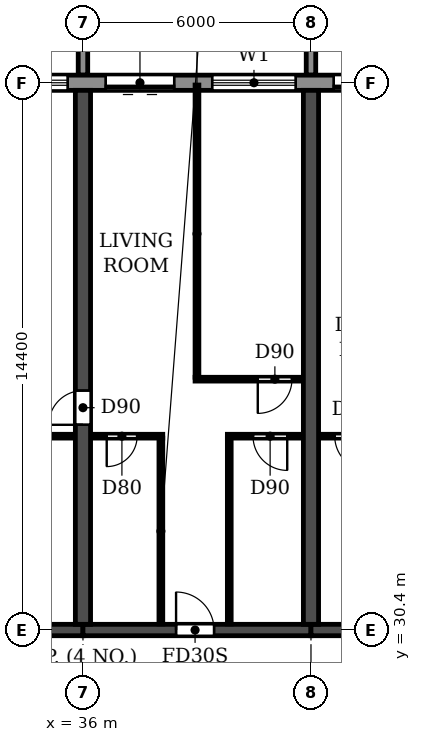
"""IFC4 building model, lengths in metres.
Left out: names, types, materials, properties, quantities, classifications, styles, units other than length and angle.
Written with IfcOpenShell. Run it as: python <this file> out.ifc"""

import sys

from ifc_helpers import new_model, si_unit, direction, frame, frame_2d, origin, place, context, subcontext, project, spatial, polyline, rectangle, outline, extrude, source, transform, mapped, element, fill, save


model = new_model("IFC4")
c1 = context("Model", 3, precision=1e-05, world=origin(), true_north=direction((0.0, 1.0)))
c2 = subcontext(c1, "Body", "Model", "MODEL_VIEW")
j1 = project(units=[si_unit("LENGTHUNIT", "METRE"), si_unit("PLANEANGLEUNIT", "RADIAN")], contexts=[c1])
p1 = place(None, origin())
s1 = spatial("IfcSite", under=j1, at=p1, CompositionType="ELEMENT")
p2 = place(p1, origin())
s2 = spatial("IfcBuilding", under=s1, at=p2, CompositionType="ELEMENT")
p3 = place(p2, frame((0.0, 0.0, 56.4)))
s3 = spatial("IfcBuildingStorey", under=s2, at=p3, CompositionType="ELEMENT", Elevation=56.4)
p4 = place(p3, frame((36.0, 30.55, 0.0), z_axis=(0.0, 0.0, 1.0), x_axis=(0.0, 1.0, 0.0)))
e1 = element("IfcWall", 1, at=p4, inside=s3, PredefinedType="SHEAR", context=c2, shape_type="SweptSolid", body=[
    extrude(rectangle(XDim=14.05, YDim=0.4, at=frame_2d((7.025, 0.0))), origin(), (0.0, 0.0, 1.0), 3.05),
])
p5 = place(p4, frame((5.25, 0.0, 0.0)))
e2 = element("IfcOpeningElement", 2, at=p5, cuts=e1, PredefinedType="OPENING", context=c2, shape_type="SweptSolid", body=[
    extrude(rectangle(XDim=0.9, YDim=2.1, at=frame_2d((0.45, 1.05))), frame((0.0, 0.21, 0.0), z_axis=(0.0, -1.0, 0.0), x_axis=(1.0, 0.0, 0.0)), (0.0, 0.0, 1.0), 0.42),
])
p6 = place(p3, frame((42.0, 30.55, 0.0), z_axis=(0.0, 0.0, 1.0), x_axis=(0.0, 1.0, 0.0)))
e3 = element("IfcWall", 3, at=p6, inside=s3, PredefinedType="SHEAR", context=c2, shape_type="SweptSolid", body=[
    extrude(rectangle(XDim=14.05, YDim=0.4, at=frame_2d((7.025, 0.0))), origin(), (0.0, 0.0, 1.0), 3.05),
])
p7 = place(p3, frame((30.0, 30.4, 0.0), z_axis=(0.0, 0.0, 1.0), x_axis=(1.0, 0.0, 0.0)))
e4 = element("IfcWall", 4, at=p7, inside=s3, PredefinedType="SHEAR", context=c2, shape_type="SweptSolid", body=[
    extrude(rectangle(XDim=6.0, YDim=0.3, at=frame_2d((3.0, 0.0))), origin(), (0.0, 0.0, 1.0), 2.45),
])
p8 = place(p3, frame((36.0, 30.4, 0.0), z_axis=(0.0, 0.0, 1.0), x_axis=(1.0, 0.0, 0.0)))
e5 = element("IfcWall", 5, at=p8, inside=s3, PredefinedType="SHEAR", context=c2, shape_type="SweptSolid", body=[
    extrude(rectangle(XDim=6.0, YDim=0.3, at=frame_2d((3.0, 0.0))), origin(), (0.0, 0.0, 1.0), 2.45),
])
p9 = place(p8, frame((2.45, 0.0, 0.0)))
e6 = element("IfcOpeningElement", 6, at=p9, cuts=e5, PredefinedType="OPENING", context=c2, shape_type="SweptSolid", body=[
    extrude(rectangle(XDim=1.0, YDim=2.1, at=frame_2d((0.5, 1.05))), frame((0.0, 0.16, 0.0), z_axis=(0.0, -1.0, 0.0), x_axis=(1.0, 0.0, 0.0)), (0.0, 0.0, 1.0), 0.32),
])
p10 = place(p3, frame((42.0, 30.4, 0.0), z_axis=(0.0, 0.0, 1.0), x_axis=(1.0, 0.0, 0.0)))
e7 = element("IfcWall", 7, at=p10, inside=s3, PredefinedType="SHEAR", context=c2, shape_type="SweptSolid", body=[
    extrude(rectangle(XDim=6.0, YDim=0.3, at=frame_2d((3.0, 0.0))), origin(), (0.0, 0.0, 1.0), 2.45),
])
p11 = place(p10, frame((2.55, 0.0, 0.0)))
e8 = element("IfcOpeningElement", 8, at=p11, cuts=e7, PredefinedType="OPENING", context=c2, shape_type="SweptSolid", body=[
    extrude(rectangle(XDim=1.0, YDim=2.1, at=frame_2d((0.5, 1.05))), frame((0.0, 0.16, 0.0), z_axis=(0.0, -1.0, 0.0), x_axis=(1.0, 0.0, 0.0)), (0.0, 0.0, 1.0), 0.32),
])
p12 = place(p3, frame((91.317, 44.8, 0.0), z_axis=(0.0, 0.0, 1.0), x_axis=(-1.0, 0.0, 0.0)))
e9 = element("IfcWall", 9, at=p12, inside=s3, PredefinedType="STANDARD", context=c2, shape_type="SweptSolid", body=[
    extrude(rectangle(XDim=80.634, YDim=0.4, at=frame_2d((40.317, 0.0))), origin(), (0.0, 0.0, 1.0), 3.05),
])
p13 = place(p12, frame((76.717, 0.0, 0.9)))
e10 = element("IfcOpeningElement", 10, at=p13, cuts=e9, PredefinedType="OPENING", context=c2, shape_type="SweptSolid", body=[
    extrude(rectangle(XDim=2.2, YDim=1.5, at=frame_2d((1.1, 0.75))), frame((0.0, 0.21, 0.0), z_axis=(0.0, -1.0, 0.0), x_axis=(1.0, 0.0, 0.0)), (0.0, 0.0, 1.0), 0.42),
])
p14 = place(p12, frame((73.917, 0.0, 0.0)))
e11 = element("IfcOpeningElement", 11, at=p14, cuts=e9, PredefinedType="OPENING", context=c2, shape_type="SweptSolid", body=[
    extrude(rectangle(XDim=1.8, YDim=2.4, at=frame_2d((0.9, 1.2))), frame((0.0, 0.21, 0.0), z_axis=(0.0, -1.0, 0.0), x_axis=(1.0, 0.0, 0.0)), (0.0, 0.0, 1.0), 0.42),
])
p15 = place(p12, frame((70.717, 0.0, 0.9)))
e12 = element("IfcOpeningElement", 12, at=p15, cuts=e9, PredefinedType="OPENING", context=c2, shape_type="SweptSolid", body=[
    extrude(rectangle(XDim=2.2, YDim=1.5, at=frame_2d((1.1, 0.75))), frame((0.0, 0.21, 0.0), z_axis=(0.0, -1.0, 0.0), x_axis=(1.0, 0.0, 0.0)), (0.0, 0.0, 1.0), 0.42),
])
p16 = place(p12, frame((67.917, 0.0, 0.0)))
e13 = element("IfcOpeningElement", 13, at=p16, cuts=e9, PredefinedType="OPENING", context=c2, shape_type="SweptSolid", body=[
    extrude(rectangle(XDim=1.8, YDim=2.4, at=frame_2d((0.9, 1.2))), frame((0.0, 0.21, 0.0), z_axis=(0.0, -1.0, 0.0), x_axis=(1.0, 0.0, 0.0)), (0.0, 0.0, 1.0), 0.42),
])
p17 = place(p12, frame((64.717, 0.0, 0.9)))
e14 = element("IfcOpeningElement", 14, at=p17, cuts=e9, PredefinedType="OPENING", context=c2, shape_type="SweptSolid", body=[
    extrude(rectangle(XDim=2.2, YDim=1.5, at=frame_2d((1.1, 0.75))), frame((0.0, 0.21, 0.0), z_axis=(0.0, -1.0, 0.0), x_axis=(1.0, 0.0, 0.0)), (0.0, 0.0, 1.0), 0.42),
])
p18 = place(p12, frame((61.917, 0.0, 0.0)))
e15 = element("IfcOpeningElement", 15, at=p18, cuts=e9, PredefinedType="OPENING", context=c2, shape_type="SweptSolid", body=[
    extrude(rectangle(XDim=1.8, YDim=2.4, at=frame_2d((0.9, 1.2))), frame((0.0, 0.21, 0.0), z_axis=(0.0, -1.0, 0.0), x_axis=(1.0, 0.0, 0.0)), (0.0, 0.0, 1.0), 0.42),
])
p19 = place(p12, frame((58.717, 0.0, 0.9)))
e16 = element("IfcOpeningElement", 16, at=p19, cuts=e9, PredefinedType="OPENING", context=c2, shape_type="SweptSolid", body=[
    extrude(rectangle(XDim=2.2, YDim=1.5, at=frame_2d((1.1, 0.75))), frame((0.0, 0.21, 0.0), z_axis=(0.0, -1.0, 0.0), x_axis=(1.0, 0.0, 0.0)), (0.0, 0.0, 1.0), 0.42),
])
p20 = place(p12, frame((55.717, 0.0, 0.9)))
e17 = element("IfcOpeningElement", 17, at=p20, cuts=e9, PredefinedType="OPENING", context=c2, shape_type="SweptSolid", body=[
    extrude(rectangle(XDim=2.2, YDim=1.5, at=frame_2d((1.1, 0.75))), frame((0.0, 0.21, 0.0), z_axis=(0.0, -1.0, 0.0), x_axis=(1.0, 0.0, 0.0)), (0.0, 0.0, 1.0), 0.42),
])
p21 = place(p12, frame((52.917, 0.0, 0.0)))
e18 = element("IfcOpeningElement", 18, at=p21, cuts=e9, PredefinedType="OPENING", context=c2, shape_type="SweptSolid", body=[
    extrude(rectangle(XDim=1.8, YDim=2.4, at=frame_2d((0.9, 1.2))), frame((0.0, 0.21, 0.0), z_axis=(0.0, -1.0, 0.0), x_axis=(1.0, 0.0, 0.0)), (0.0, 0.0, 1.0), 0.42),
])
p22 = place(p12, frame((49.717, 0.0, 0.9)))
e19 = element("IfcOpeningElement", 19, at=p22, cuts=e9, PredefinedType="OPENING", context=c2, shape_type="SweptSolid", body=[
    extrude(rectangle(XDim=2.2, YDim=1.5, at=frame_2d((1.1, 0.75))), frame((0.0, 0.21, 0.0), z_axis=(0.0, -1.0, 0.0), x_axis=(1.0, 0.0, 0.0)), (0.0, 0.0, 1.0), 0.42),
])
p23 = place(p12, frame((46.917, 0.0, 0.0)))
e20 = element("IfcOpeningElement", 20, at=p23, cuts=e9, PredefinedType="OPENING", context=c2, shape_type="SweptSolid", body=[
    extrude(rectangle(XDim=1.8, YDim=2.4, at=frame_2d((0.9, 1.2))), frame((0.0, 0.21, 0.0), z_axis=(0.0, -1.0, 0.0), x_axis=(1.0, 0.0, 0.0)), (0.0, 0.0, 1.0), 0.42),
])
p24 = place(p12, frame((43.717, 0.0, 0.9)))
e21 = element("IfcOpeningElement", 21, at=p24, cuts=e9, PredefinedType="OPENING", context=c2, shape_type="SweptSolid", body=[
    extrude(rectangle(XDim=2.2, YDim=1.5, at=frame_2d((1.1, 0.75))), frame((0.0, 0.21, 0.0), z_axis=(0.0, -1.0, 0.0), x_axis=(1.0, 0.0, 0.0)), (0.0, 0.0, 1.0), 0.42),
])
p25 = place(p12, frame((40.717, 0.0, 0.9)))
e22 = element("IfcOpeningElement", 22, at=p25, cuts=e9, PredefinedType="OPENING", context=c2, shape_type="SweptSolid", body=[
    extrude(rectangle(XDim=2.2, YDim=1.5, at=frame_2d((1.1, 0.75))), frame((0.0, 0.21, 0.0), z_axis=(0.0, -1.0, 0.0), x_axis=(1.0, 0.0, 0.0)), (0.0, 0.0, 1.0), 0.42),
])
p26 = place(p12, frame((37.717, 0.0, 0.9)))
e23 = element("IfcOpeningElement", 23, at=p26, cuts=e9, PredefinedType="OPENING", context=c2, shape_type="SweptSolid", body=[
    extrude(rectangle(XDim=2.2, YDim=1.5, at=frame_2d((1.1, 0.75))), frame((0.0, 0.21, 0.0), z_axis=(0.0, -1.0, 0.0), x_axis=(1.0, 0.0, 0.0)), (0.0, 0.0, 1.0), 0.42),
])
p27 = place(p12, frame((34.717, 0.0, 0.9)))
e24 = element("IfcOpeningElement", 24, at=p27, cuts=e9, PredefinedType="OPENING", context=c2, shape_type="SweptSolid", body=[
    extrude(rectangle(XDim=2.2, YDim=1.5, at=frame_2d((1.1, 0.75))), frame((0.0, 0.21, 0.0), z_axis=(0.0, -1.0, 0.0), x_axis=(1.0, 0.0, 0.0)), (0.0, 0.0, 1.0), 0.42),
])
p28 = place(p12, frame((31.917, 0.0, 0.0)))
e25 = element("IfcOpeningElement", 25, at=p28, cuts=e9, PredefinedType="OPENING", context=c2, shape_type="SweptSolid", body=[
    extrude(rectangle(XDim=1.8, YDim=2.4, at=frame_2d((0.9, 1.2))), frame((0.0, 0.21, 0.0), z_axis=(0.0, -1.0, 0.0), x_axis=(1.0, 0.0, 0.0)), (0.0, 0.0, 1.0), 0.42),
])
p29 = place(p12, frame((28.917, 0.0, 0.0)))
e26 = element("IfcOpeningElement", 26, at=p29, cuts=e9, PredefinedType="OPENING", context=c2, shape_type="SweptSolid", body=[
    extrude(rectangle(XDim=1.8, YDim=2.4, at=frame_2d((0.9, 1.2))), frame((0.0, 0.21, 0.0), z_axis=(0.0, -1.0, 0.0), x_axis=(1.0, 0.0, 0.0)), (0.0, 0.0, 1.0), 0.42),
])
p30 = place(p12, frame((25.717, 0.0, 0.9)))
e27 = element("IfcOpeningElement", 27, at=p30, cuts=e9, PredefinedType="OPENING", context=c2, shape_type="SweptSolid", body=[
    extrude(rectangle(XDim=2.2, YDim=1.5, at=frame_2d((1.1, 0.75))), frame((0.0, 0.21, 0.0), z_axis=(0.0, -1.0, 0.0), x_axis=(1.0, 0.0, 0.0)), (0.0, 0.0, 1.0), 0.42),
])
p31 = place(p12, frame((22.917, 0.0, 0.0)))
e28 = element("IfcOpeningElement", 28, at=p31, cuts=e9, PredefinedType="OPENING", context=c2, shape_type="SweptSolid", body=[
    extrude(rectangle(XDim=1.8, YDim=2.4, at=frame_2d((0.9, 1.2))), frame((0.0, 0.21, 0.0), z_axis=(0.0, -1.0, 0.0), x_axis=(1.0, 0.0, 0.0)), (0.0, 0.0, 1.0), 0.42),
])
p32 = place(p12, frame((19.717, 0.0, 0.9)))
e29 = element("IfcOpeningElement", 29, at=p32, cuts=e9, PredefinedType="OPENING", context=c2, shape_type="SweptSolid", body=[
    extrude(rectangle(XDim=2.2, YDim=1.5, at=frame_2d((1.1, 0.75))), frame((0.0, 0.21, 0.0), z_axis=(0.0, -1.0, 0.0), x_axis=(1.0, 0.0, 0.0)), (0.0, 0.0, 1.0), 0.42),
])
p33 = place(p12, frame((16.917, 0.0, 0.0)))
e30 = element("IfcOpeningElement", 30, at=p33, cuts=e9, PredefinedType="OPENING", context=c2, shape_type="SweptSolid", body=[
    extrude(rectangle(XDim=1.8, YDim=2.4, at=frame_2d((0.9, 1.2))), frame((0.0, 0.21, 0.0), z_axis=(0.0, -1.0, 0.0), x_axis=(1.0, 0.0, 0.0)), (0.0, 0.0, 1.0), 0.42),
])
p34 = place(p12, frame((13.717, 0.0, 0.9)))
e31 = element("IfcOpeningElement", 31, at=p34, cuts=e9, PredefinedType="OPENING", context=c2, shape_type="SweptSolid", body=[
    extrude(rectangle(XDim=2.2, YDim=1.5, at=frame_2d((1.1, 0.75))), frame((0.0, 0.21, 0.0), z_axis=(0.0, -1.0, 0.0), x_axis=(1.0, 0.0, 0.0)), (0.0, 0.0, 1.0), 0.42),
])
p35 = place(p12, frame((10.917, 0.0, 0.0)))
e32 = element("IfcOpeningElement", 32, at=p35, cuts=e9, PredefinedType="OPENING", context=c2, shape_type="SweptSolid", body=[
    extrude(rectangle(XDim=1.8, YDim=2.4, at=frame_2d((0.9, 1.2))), frame((0.0, 0.21, 0.0), z_axis=(0.0, -1.0, 0.0), x_axis=(1.0, 0.0, 0.0)), (0.0, 0.0, 1.0), 0.42),
])
p36 = place(p12, frame((7.717, 0.0, 0.9)))
e33 = element("IfcOpeningElement", 33, at=p36, cuts=e9, PredefinedType="OPENING", context=c2, shape_type="SweptSolid", body=[
    extrude(rectangle(XDim=2.2, YDim=1.5, at=frame_2d((1.1, 0.75))), frame((0.0, 0.21, 0.0), z_axis=(0.0, -1.0, 0.0), x_axis=(1.0, 0.0, 0.0)), (0.0, 0.0, 1.0), 0.42),
])
p37 = place(p12, frame((4.717, 0.0, 0.9)))
e34 = element("IfcOpeningElement", 34, at=p37, cuts=e9, PredefinedType="OPENING", context=c2, shape_type="SweptSolid", body=[
    extrude(rectangle(XDim=2.2, YDim=1.5, at=frame_2d((1.1, 0.75))), frame((0.0, 0.21, 0.0), z_axis=(0.0, -1.0, 0.0), x_axis=(1.0, 0.0, 0.0)), (0.0, 0.0, 1.0), 0.42),
])
p38 = place(p12, frame((1.717, 0.0, 0.9)))
e35 = element("IfcOpeningElement", 35, at=p38, cuts=e9, PredefinedType="OPENING", context=c2, shape_type="SweptSolid", body=[
    extrude(rectangle(XDim=2.2, YDim=1.5, at=frame_2d((1.1, 0.75))), frame((0.0, 0.21, 0.0), z_axis=(0.0, -1.0, 0.0), x_axis=(1.0, 0.0, 0.0)), (0.0, 0.0, 1.0), 0.42),
])
m1 = source(origin(), c2, "Body", "SweptSolid", [
    extrude(outline(polyline([(0.0, 0.0), (0.25, 0.0), (0.25, 3.1), (0.0, 3.1), (0.0, 0.0)])), origin(), (0.0, 0.0, 1.0), 3.1),
])
for number, where in (
    (36, (35.875, 45.0, 0.0)),
    (37, (41.875, 45.0, 0.0)),
):
    element("IfcWall", number, at=place(p3, frame(where)), inside=s3, PredefinedType="STANDARD", context=c2, shape_type="MappedRepresentation", body=[
        mapped(m1, transform((0.0, 0.0, 0.0))),
    ])
p39 = place(p3, frame((33.1, 35.5, 0.0), z_axis=(0.0, 0.0, 1.0), x_axis=(1.0, 0.0, 0.0)))
e38 = element("IfcWall", 38, at=p39, inside=s3, PredefinedType="PARTITIONING", context=c2, shape_type="SweptSolid", body=[
    extrude(rectangle(XDim=2.69, YDim=0.1, at=frame_2d((1.345, 0.0))), origin(), (0.0, 0.0, 1.0), 3.05),
])
p40 = place(p39, frame((1.0, 0.0, 0.0)))
e39 = element("IfcOpeningElement", 39, at=p40, cuts=e38, PredefinedType="OPENING", context=c2, shape_type="SweptSolid", body=[
    extrude(rectangle(XDim=0.8, YDim=2.1, at=frame_2d((0.4, 1.05))), frame((0.0, 0.06, 0.0), z_axis=(0.0, -1.0, 0.0), x_axis=(1.0, 0.0, 0.0)), (0.0, 0.0, 1.0), 0.12),
])
p41 = place(p3, frame((36.21, 35.5, 0.0), z_axis=(0.0, 0.0, 1.0), x_axis=(1.0, 0.0, 0.0)))
e40 = element("IfcWall", 40, at=p41, inside=s3, PredefinedType="PARTITIONING", context=c2, shape_type="SweptSolid", body=[
    extrude(rectangle(XDim=1.89, YDim=0.1, at=frame_2d((0.945, 0.0))), origin(), (0.0, 0.0, 1.0), 3.05),
])
p42 = place(p41, frame((0.415, 0.0, 0.0)))
e41 = element("IfcOpeningElement", 41, at=p42, cuts=e40, PredefinedType="OPENING", context=c2, shape_type="SweptSolid", body=[
    extrude(rectangle(XDim=0.8, YDim=2.1, at=frame_2d((0.4, 1.05))), frame((0.0, 0.06, 0.0), z_axis=(0.0, -1.0, 0.0), x_axis=(1.0, 0.0, 0.0)), (0.0, 0.0, 1.0), 0.12),
])
p43 = place(p3, frame((39.8, 35.5, 0.0), z_axis=(0.0, 0.0, 1.0), x_axis=(1.0, 0.0, 0.0)))
e42 = element("IfcWall", 42, at=p43, inside=s3, PredefinedType="PARTITIONING", context=c2, shape_type="SweptSolid", body=[
    extrude(rectangle(XDim=1.99, YDim=0.1, at=frame_2d((0.995, 0.0))), origin(), (0.0, 0.0, 1.0), 3.05),
])
p44 = place(p43, frame((0.675, 0.0, 0.0)))
e43 = element("IfcOpeningElement", 43, at=p44, cuts=e42, PredefinedType="OPENING", context=c2, shape_type="SweptSolid", body=[
    extrude(rectangle(XDim=0.9, YDim=2.1, at=frame_2d((0.45, 1.05))), frame((0.0, 0.06, 0.0), z_axis=(0.0, -1.0, 0.0), x_axis=(1.0, 0.0, 0.0)), (0.0, 0.0, 1.0), 0.12),
])
p45 = place(p3, frame((42.21, 35.5, 0.0), z_axis=(0.0, 0.0, 1.0), x_axis=(1.0, 0.0, 0.0)))
e44 = element("IfcWall", 44, at=p45, inside=s3, PredefinedType="PARTITIONING", context=c2, shape_type="SweptSolid", body=[
    extrude(rectangle(XDim=1.99, YDim=0.1, at=frame_2d((0.995, 0.0))), origin(), (0.0, 0.0, 1.0), 3.05),
])
p46 = place(p45, frame((0.415, 0.0, 0.0)))
e45 = element("IfcOpeningElement", 45, at=p46, cuts=e44, PredefinedType="OPENING", context=c2, shape_type="SweptSolid", body=[
    extrude(rectangle(XDim=0.9, YDim=2.1, at=frame_2d((0.45, 1.05))), frame((0.0, 0.06, 0.0), z_axis=(0.0, -1.0, 0.0), x_axis=(1.0, 0.0, 0.0)), (0.0, 0.0, 1.0), 0.12),
])
p47 = place(p3, frame((38.95, 37.0, 0.0), z_axis=(0.0, 0.0, 1.0), x_axis=(1.0, 0.0, 0.0)))
e46 = element("IfcWall", 46, at=p47, inside=s3, PredefinedType="PARTITIONING", context=c2, shape_type="SweptSolid", body=[
    extrude(rectangle(XDim=2.84, YDim=0.1, at=frame_2d((1.42, 0.0))), origin(), (0.0, 0.0, 1.0), 3.05),
])
p48 = place(p47, frame((1.65, 0.0, 0.0)))
e47 = element("IfcOpeningElement", 47, at=p48, cuts=e46, PredefinedType="OPENING", context=c2, shape_type="SweptSolid", body=[
    extrude(rectangle(XDim=0.9, YDim=2.1, at=frame_2d((0.45, 1.05))), frame((0.0, 0.06, 0.0), z_axis=(0.0, -1.0, 0.0), x_axis=(1.0, 0.0, 0.0)), (0.0, 0.0, 1.0), 0.12),
])
p49 = place(p3, frame((38.05, 30.56, 0.0), z_axis=(0.0, 0.0, 1.0), x_axis=(0.0, 1.0, 0.0)))
e48 = element("IfcWall", 48, at=p49, inside=s3, PredefinedType="PARTITIONING", context=c2, shape_type="SweptSolid", body=[
    extrude(rectangle(XDim=4.89, YDim=0.1, at=frame_2d((2.445, 0.0))), origin(), (0.0, 0.0, 1.0), 3.05),
])
p50 = place(p3, frame((39.0, 37.05, 0.0), z_axis=(0.0, 0.0, 1.0), x_axis=(0.0, 1.0, 0.0)))
e49 = element("IfcWall", 49, at=p50, inside=s3, PredefinedType="PARTITIONING", context=c2, shape_type="SweptSolid", body=[
    extrude(rectangle(XDim=7.69, YDim=0.1, at=frame_2d((3.845, 0.0))), origin(), (0.0, 0.0, 1.0), 3.05),
])
p51 = place(p3, frame((39.85, 30.56, 0.0), z_axis=(0.0, 0.0, 1.0), x_axis=(0.0, 1.0, 0.0)))
e50 = element("IfcWall", 50, at=p51, inside=s3, PredefinedType="PARTITIONING", context=c2, shape_type="SweptSolid", body=[
    extrude(rectangle(XDim=4.89, YDim=0.1, at=frame_2d((2.445, 0.0))), origin(), (0.0, 0.0, 1.0), 3.05),
])
p52 = place(p20, origin())
e51 = element("IfcWindow", 51, at=p52, inside=s3, PartitioningType="DOUBLE_PANEL_HORIZONTAL", PredefinedType="WINDOW", context=c2, shape_type="SweptSolid", body=[
    extrude(rectangle(XDim=2.2, YDim=1.5, at=frame_2d((1.1, 0.75))), frame((0.0, 0.03, 0.0), z_axis=(0.0, -1.0, 0.0), x_axis=(1.0, 0.0, 0.0)), (0.0, 0.0, 1.0), 0.06),
])
fill(e17, e51)
p53 = place(p21, origin())
e52 = element("IfcDoor", 52, at=p53, inside=s3, OperationType="DOUBLE_DOOR_SLIDING", PredefinedType="DOOR", context=c2, shape_type="SweptSolid", body=[
    extrude(rectangle(XDim=1.8, YDim=2.4, at=frame_2d((0.9, 1.2))), frame((0.0, 0.025, 0.0), z_axis=(0.0, -1.0, 0.0), x_axis=(1.0, 0.0, 0.0)), (0.0, 0.0, 1.0), 0.05),
])
fill(e18, e52)
p54 = place(p22, origin())
e53 = element("IfcWindow", 53, at=p54, inside=s3, PartitioningType="DOUBLE_PANEL_HORIZONTAL", PredefinedType="WINDOW", context=c2, shape_type="SweptSolid", body=[
    extrude(rectangle(XDim=2.2, YDim=1.5, at=frame_2d((1.1, 0.75))), frame((0.0, 0.03, 0.0), z_axis=(0.0, -1.0, 0.0), x_axis=(1.0, 0.0, 0.0)), (0.0, 0.0, 1.0), 0.06),
])
fill(e19, e53)
p55 = place(p23, origin())
e54 = element("IfcDoor", 54, at=p55, inside=s3, OperationType="DOUBLE_DOOR_SLIDING", PredefinedType="DOOR", context=c2, shape_type="SweptSolid", body=[
    extrude(rectangle(XDim=1.8, YDim=2.4, at=frame_2d((0.9, 1.2))), frame((0.0, 0.025, 0.0), z_axis=(0.0, -1.0, 0.0), x_axis=(1.0, 0.0, 0.0)), (0.0, 0.0, 1.0), 0.05),
])
fill(e20, e54)
p56 = place(p5, origin())
e55 = element("IfcDoor", 55, at=p56, inside=s3, OperationType="SINGLE_SWING_LEFT", PredefinedType="DOOR", context=c2, shape_type="SweptSolid", body=[
    extrude(rectangle(XDim=0.9, YDim=2.1, at=frame_2d((0.45, 1.05))), frame((0.0, 0.025, 0.0), z_axis=(0.0, -1.0, 0.0), x_axis=(1.0, 0.0, 0.0)), (0.0, 0.0, 1.0), 0.05),
])
fill(e2, e55)
p57 = place(p42, frame((0.8, 0.0, 0.0), z_axis=(0.0, 0.0, 1.0), x_axis=(-1.0, 0.0, 0.0)))
e56 = element("IfcDoor", 56, at=p57, inside=s3, OperationType="SINGLE_SWING_RIGHT", PredefinedType="DOOR", context=c2, shape_type="SweptSolid", body=[
    extrude(rectangle(XDim=0.8, YDim=2.1, at=frame_2d((0.4, 1.05))), frame((0.0, 0.025, 0.0), z_axis=(0.0, -1.0, 0.0), x_axis=(1.0, 0.0, 0.0)), (0.0, 0.0, 1.0), 0.05),
])
fill(e41, e56)
p58 = place(p9, origin())
e57 = element("IfcDoor", 57, at=p58, inside=s3, OperationType="SINGLE_SWING_LEFT", PredefinedType="DOOR", context=c2, shape_type="SweptSolid", body=[
    extrude(rectangle(XDim=1.0, YDim=2.1, at=frame_2d((0.5, 1.05))), frame((0.0, 0.025, 0.0), z_axis=(0.0, -1.0, 0.0), x_axis=(1.0, 0.0, 0.0)), (0.0, 0.0, 1.0), 0.05),
])
fill(e6, e57)
p59 = place(p44, frame((0.9, 0.0, 0.0), z_axis=(0.0, 0.0, 1.0), x_axis=(-1.0, 0.0, 0.0)))
e58 = element("IfcDoor", 58, at=p59, inside=s3, OperationType="SINGLE_SWING_LEFT", PredefinedType="DOOR", context=c2, shape_type="SweptSolid", body=[
    extrude(rectangle(XDim=0.9, YDim=2.1, at=frame_2d((0.45, 1.05))), frame((0.0, 0.025, 0.0), z_axis=(0.0, -1.0, 0.0), x_axis=(1.0, 0.0, 0.0)), (0.0, 0.0, 1.0), 0.05),
])
fill(e43, e58)
p60 = place(p48, frame((0.9, 0.0, 0.0), z_axis=(0.0, 0.0, 1.0), x_axis=(-1.0, 0.0, 0.0)))
e59 = element("IfcDoor", 59, at=p60, inside=s3, OperationType="SINGLE_SWING_RIGHT", PredefinedType="DOOR", context=c2, shape_type="SweptSolid", body=[
    extrude(rectangle(XDim=0.9, YDim=2.1, at=frame_2d((0.45, 1.05))), frame((0.0, 0.025, 0.0), z_axis=(0.0, -1.0, 0.0), x_axis=(1.0, 0.0, 0.0)), (0.0, 0.0, 1.0), 0.05),
])
fill(e47, e59)
p61 = place(p46, frame((0.9, 0.0, 0.0), z_axis=(0.0, 0.0, 1.0), x_axis=(-1.0, 0.0, 0.0)))
e60 = element("IfcDoor", 60, at=p61, inside=s3, OperationType="SINGLE_SWING_LEFT", PredefinedType="DOOR", context=c2, shape_type="SweptSolid", body=[
    extrude(rectangle(XDim=0.9, YDim=2.1, at=frame_2d((0.45, 1.05))), frame((0.0, 0.025, 0.0), z_axis=(0.0, -1.0, 0.0), x_axis=(1.0, 0.0, 0.0)), (0.0, 0.0, 1.0), 0.05),
])
fill(e45, e60)
save(model, sys.argv[1])
